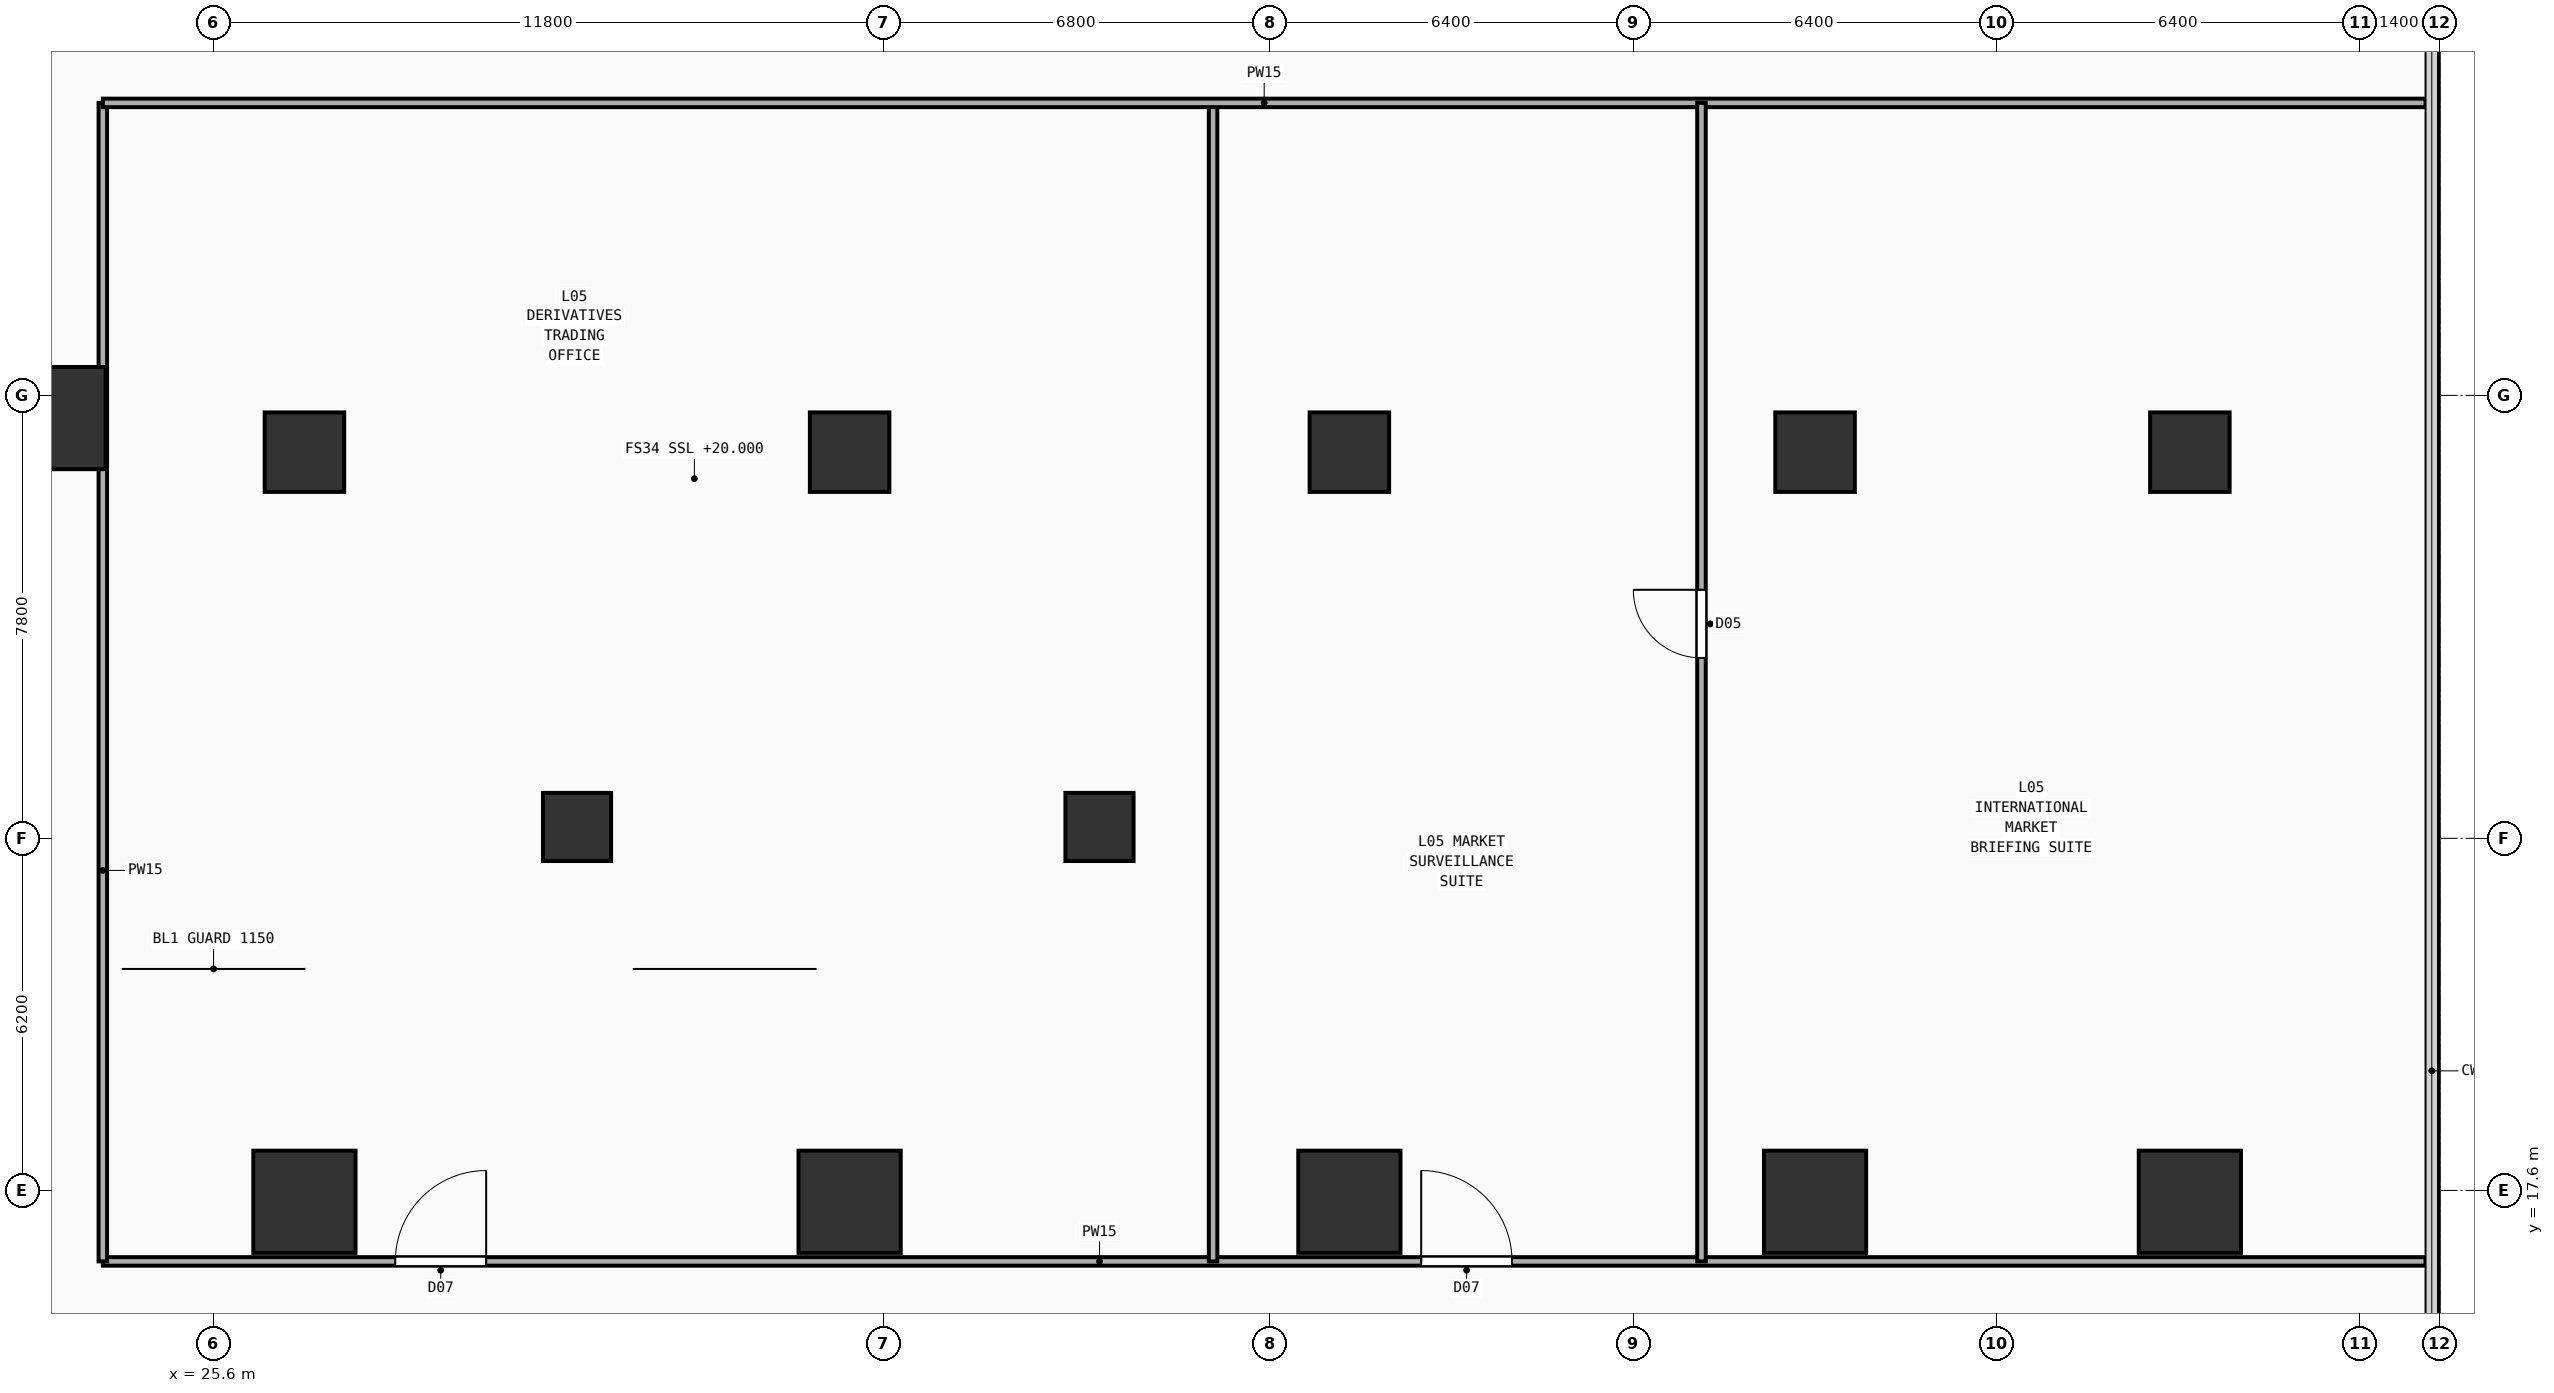
"""IFC4 building model, lengths in metres.
Left out: names, types, materials, properties, quantities, classifications, styles, units other than length and angle.
Written with IfcOpenShell. Run it as: python <this file> out.ifc"""

import sys

from ifc_helpers import new_model, si_unit, direction, frame, frame_2d, origin, origin_2d, place, context, subcontext, project, spatial, rectangle, circle, extrude, element, fill, save


model = new_model("IFC4")
c1 = context("Model", 3, precision=1e-05, world=origin(), true_north=direction((0.0, 1.0)))
c2 = subcontext(c1, "Body", "Model", "MODEL_VIEW")
j1 = project(units=[si_unit("LENGTHUNIT", "METRE"), si_unit("PLANEANGLEUNIT", "RADIAN")], contexts=[c1])
p1 = place(None, origin())
s1 = spatial("IfcSite", under=j1, at=p1, CompositionType="ELEMENT")
p2 = place(p1, origin())
s2 = spatial("IfcBuilding", under=s1, at=p2, CompositionType="ELEMENT")
p3 = place(p2, frame((0.0, 0.0, 20.0)))
s3 = spatial("IfcBuildingStorey", under=s2, at=p3, CompositionType="ELEMENT", Elevation=20.0)
for number, where, z_axis, x_axis in (
    (1, (27.2, 17.4, 0.0), (0.0, 0.0, 1.0), (1.0, 0.0, 0.0)),
    (2, (36.8, 17.4, 0.0), (0.0, 0.0, 1.0), (1.0, 0.0, 0.0)),
    (3, (45.6, 17.4, 0.0), (0.0, 0.0, 1.0), (1.0, 0.0, 0.0)),
    (4, (53.8, 17.4, 0.0), (0.0, 0.0, 1.0), (1.0, 0.0, 0.0)),
    (5, (60.4, 17.4, 0.0), (0.0, 0.0, 1.0), (1.0, 0.0, 0.0)),
    (6, (22.8, 31.2, 0.0), (0.0, 0.0, 1.0), (1.0, 0.0, 0.0)),
):
    element("IfcColumn", number, at=place(p3, frame(where, z_axis=z_axis, x_axis=x_axis)), inside=s3, PredefinedType="COLUMN", context=c2, shape_type="SweptSolid", body=[
        extrude(rectangle(XDim=1.8, YDim=1.8, at=origin_2d()), origin(), (0.0, 0.0, 1.0), 4.46),
    ])
for number, where, z_axis, x_axis in (
    (7, (27.2, 30.6, 0.0), (0.0, 0.0, 1.0), (1.0, 0.0, 0.0)),
    (8, (36.8, 30.6, 0.0), (0.0, 0.0, 1.0), (1.0, 0.0, 0.0)),
    (9, (45.6, 30.6, 0.0), (0.0, 0.0, 1.0), (1.0, 0.0, 0.0)),
    (10, (53.8, 30.6, 0.0), (0.0, 0.0, 1.0), (1.0, 0.0, 0.0)),
    (11, (60.4, 30.6, 0.0), (0.0, 0.0, 1.0), (1.0, 0.0, 0.0)),
):
    element("IfcColumn", number, at=place(p3, frame(where, z_axis=z_axis, x_axis=x_axis)), inside=s3, PredefinedType="COLUMN", context=c2, shape_type="SweptSolid", body=[
        extrude(rectangle(XDim=1.4, YDim=1.4, at=origin_2d()), origin(), (0.0, 0.0, 1.0), 4.46),
    ])
for number, where, z_axis, x_axis in (
    (12, (32.0, 24.0, 0.0), (0.0, 0.0, 1.0), (1.0, 0.0, 0.0)),
    (13, (41.2, 24.0, 0.0), (0.0, 0.0, 1.0), (1.0, 0.0, 0.0)),
):
    element("IfcColumn", number, at=place(p3, frame(where, z_axis=z_axis, x_axis=x_axis)), inside=s3, PredefinedType="COLUMN", context=c2, shape_type="SweptSolid", body=[
        extrude(circle(Radius=0.6, at=origin_2d()), origin(), (0.0, 0.0, 1.0), 4.46),
    ])
p4 = place(p3, frame((23.65, 16.35, 0.0), z_axis=(0.0, 0.0, 1.0), x_axis=(1.0, 0.0, 0.0)))
e14 = element("IfcWall", 14, at=p4, inside=s3, PredefinedType="PARTITIONING", context=c2, shape_type="SweptSolid", body=[
    extrude(rectangle(XDim=40.9, YDim=0.15, at=frame_2d((20.45, 0.0))), origin(), (0.0, 0.0, 1.0), 4.46),
])
p5 = place(p4, frame((5.15, 0.0, 0.0)))
e15 = element("IfcOpeningElement", 15, at=p5, cuts=e14, PredefinedType="OPENING", context=c2, shape_type="SweptSolid", body=[
    extrude(rectangle(XDim=1.6, YDim=2.4, at=frame_2d((0.8, 1.2))), frame((0.0, 0.085, 0.0), z_axis=(0.0, -1.0, 0.0), x_axis=(1.0, 0.0, 0.0)), (0.0, 0.0, 1.0), 0.17),
])
p6 = place(p4, frame((23.215, 0.0, 0.0)))
e16 = element("IfcOpeningElement", 16, at=p6, cuts=e14, PredefinedType="OPENING", context=c2, shape_type="SweptSolid", body=[
    extrude(rectangle(XDim=1.6, YDim=2.4, at=frame_2d((0.8, 1.2))), frame((0.0, 0.085, 0.0), z_axis=(0.0, -1.0, 0.0), x_axis=(1.0, 0.0, 0.0)), (0.0, 0.0, 1.0), 0.17),
])
for number, where, z_axis, x_axis in (
    (17, (23.65, 16.35, 0.0), (0.0, 0.0, 1.0), (0.0, 1.0, 0.0)),
    (18, (43.2, 16.35, 0.0), (0.0, 0.0, 1.0), (0.0, 1.0, 0.0)),
):
    element("IfcWall", number, at=place(p3, frame(where, z_axis=z_axis, x_axis=x_axis)), inside=s3, PredefinedType="PARTITIONING", context=c2, shape_type="SweptSolid", body=[
        extrude(rectangle(XDim=20.4, YDim=0.15, at=frame_2d((10.2, 0.0))), origin(), (0.0, 0.0, 1.0), 4.46),
    ])
p7 = place(p3, frame((23.65, 36.75, 0.0), z_axis=(0.0, 0.0, 1.0), x_axis=(1.0, 0.0, 0.0)))
e19 = element("IfcWall", 19, at=p7, inside=s3, PredefinedType="PARTITIONING", context=c2, shape_type="SweptSolid", body=[
    extrude(rectangle(XDim=40.9, YDim=0.15, at=frame_2d((20.45, 0.0))), origin(), (0.0, 0.0, 1.0), 4.46),
])
p8 = place(p3, frame((51.8, 16.35, 0.0), z_axis=(0.0, 0.0, 1.0), x_axis=(0.0, 1.0, 0.0)))
e20 = element("IfcWall", 20, at=p8, inside=s3, PredefinedType="PARTITIONING", context=c2, shape_type="SweptSolid", body=[
    extrude(rectangle(XDim=20.4, YDim=0.15, at=frame_2d((10.2, 0.0))), origin(), (0.0, 0.0, 1.0), 4.46),
])
p9 = place(p8, frame((10.626, 0.0, 0.0)))
e21 = element("IfcOpeningElement", 21, at=p9, cuts=e20, PredefinedType="OPENING", context=c2, shape_type="SweptSolid", body=[
    extrude(rectangle(XDim=1.2, YDim=2.25, at=frame_2d((0.6, 1.125))), frame((0.0, 0.085, 0.0), z_axis=(0.0, -1.0, 0.0), x_axis=(1.0, 0.0, 0.0)), (0.0, 0.0, 1.0), 0.17),
])
p10 = place(p5, origin())
e22 = element("IfcDoor", 22, at=p10, inside=s3, OperationType="SINGLE_SWING_RIGHT", PredefinedType="DOOR", context=c2, shape_type="SweptSolid", body=[
    extrude(rectangle(XDim=1.6, YDim=2.4, at=frame_2d((0.8, 1.2))), frame((0.0, 0.025, 0.0), z_axis=(0.0, -1.0, 0.0), x_axis=(1.0, 0.0, 0.0)), (0.0, 0.0, 1.0), 0.05),
])
fill(e15, e22)
p11 = place(p6, origin())
e23 = element("IfcDoor", 23, at=p11, inside=s3, OperationType="SINGLE_SWING_LEFT", PredefinedType="DOOR", context=c2, shape_type="SweptSolid", body=[
    extrude(rectangle(XDim=1.6, YDim=2.4, at=frame_2d((0.8, 1.2))), frame((0.0, 0.025, 0.0), z_axis=(0.0, -1.0, 0.0), x_axis=(1.0, 0.0, 0.0)), (0.0, 0.0, 1.0), 0.05),
])
fill(e16, e23)
p12 = place(p9, origin())
e24 = element("IfcDoor", 24, at=p12, inside=s3, OperationType="SINGLE_SWING_RIGHT", PredefinedType="DOOR", context=c2, shape_type="SweptSolid", body=[
    extrude(rectangle(XDim=1.2, YDim=2.25, at=frame_2d((0.6, 1.125))), frame((0.0, 0.025, 0.0), z_axis=(0.0, -1.0, 0.0), x_axis=(1.0, 0.0, 0.0)), (0.0, 0.0, 1.0), 0.05),
])
fill(e21, e24)
save(model, sys.argv[1])
